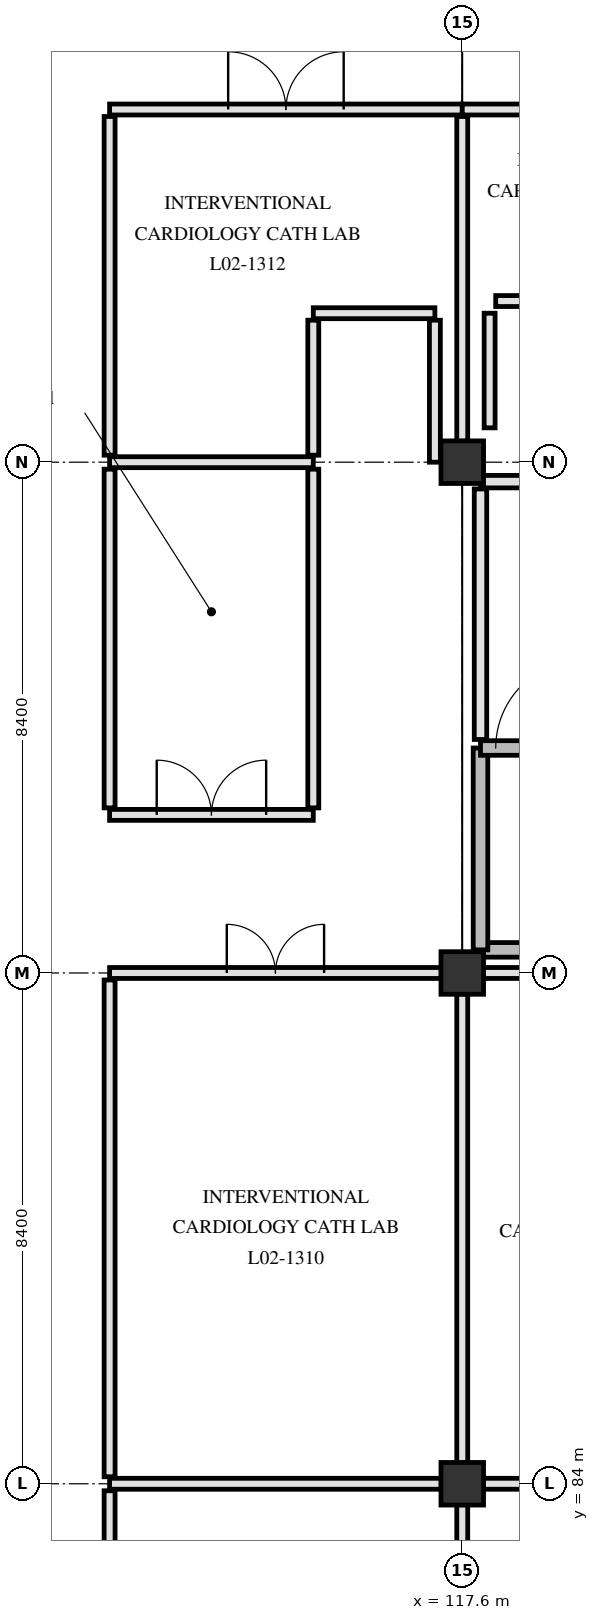
"""IFC4 building model, lengths in metres.
Left out: names, types, materials, properties, quantities, classifications, styles, units other than length and angle.
Written with IfcOpenShell. Run it as: python <this file> out.ifc"""

import sys

from ifc_helpers import new_model, si_unit, direction, frame, frame_2d, origin, origin_2d, place, context, subcontext, project, spatial, rectangle, extrude, element, fill, save


model = new_model("IFC4")
c1 = context("Model", 3, precision=1e-05, world=origin(), true_north=direction((0.0, 1.0)))
c2 = subcontext(c1, "Body", "Model", "MODEL_VIEW")
j1 = project(units=[si_unit("LENGTHUNIT", "METRE"), si_unit("PLANEANGLEUNIT", "RADIAN")], contexts=[c1])
p1 = place(None, origin())
s1 = spatial("IfcSite", under=j1, at=p1, CompositionType="ELEMENT")
p2 = place(p1, origin())
s2 = spatial("IfcBuilding", under=s1, at=p2, CompositionType="ELEMENT")
p3 = place(p2, frame((0.0, 0.0, 9.3)))
s3 = spatial("IfcBuildingStorey", under=s2, at=p3, CompositionType="ELEMENT", Elevation=9.3)
for number, where, z_axis, x_axis in (
    (1, (117.6, 84.0, 0.0), (0.0, 0.0, 1.0), (1.0, 0.0, 0.0)),
    (2, (117.6, 92.4, 0.0), (0.0, 0.0, 1.0), (1.0, 0.0, 0.0)),
    (3, (117.6, 100.8, 0.0), (0.0, 0.0, 1.0), (1.0, 0.0, 0.0)),
):
    element("IfcColumn", number, at=place(p3, frame(where, z_axis=z_axis, x_axis=x_axis)), inside=s3, PredefinedType="COLUMN", context=c2, shape_type="SweptSolid", body=[
        extrude(rectangle(XDim=0.7, YDim=0.7, at=origin_2d()), origin(), (0.0, 0.0, 1.0), 5.1),
    ])
p4 = place(p3, frame((117.9, 92.78, 0.0), z_axis=(0.0, 0.0, 1.0), x_axis=(1.0, 0.0, 0.0)))
e4 = element("IfcWall", 4, at=p4, inside=s3, PredefinedType="SHEAR", context=c2, shape_type="SweptSolid", body=[
    extrude(rectangle(XDim=7.82, YDim=0.24, at=frame_2d((3.91, 0.0))), origin(), (0.0, 0.0, 1.0), 4.78),
])
p5 = place(p3, frame((117.9, 92.78, 0.0), z_axis=(0.0, 0.0, 1.0), x_axis=(0.0, 1.0, 0.0)))
e5 = element("IfcWall", 5, at=p5, inside=s3, PredefinedType="SHEAR", context=c2, shape_type="SweptSolid", body=[
    extrude(rectangle(XDim=3.32, YDim=0.24, at=frame_2d((1.66, 0.0))), origin(), (0.0, 0.0, 1.0), 4.78),
])
p6 = place(p3, frame((117.9, 96.1, 0.0), z_axis=(0.0, 0.0, 1.0), x_axis=(1.0, 0.0, 0.0)))
e6 = element("IfcWall", 6, at=p6, inside=s3, PredefinedType="SHEAR", context=c2, shape_type="SweptSolid", body=[
    extrude(rectangle(XDim=7.82, YDim=0.24, at=frame_2d((3.91, 0.0))), origin(), (0.0, 0.0, 1.0), 4.78),
])
p7 = place(p6, frame((0.25, 0.0, 0.0)))
e7 = element("IfcOpeningElement", 7, at=p7, cuts=e6, PredefinedType="OPENING", context=c2, shape_type="SweptSolid", body=[
    extrude(rectangle(XDim=1.45, YDim=2.2, at=frame_2d((0.725, 1.1))), frame((0.0, 0.13, 0.0), z_axis=(0.0, -1.0, 0.0), x_axis=(1.0, 0.0, 0.0)), (0.0, 0.0, 1.0), 0.26),
])
p8 = place(p3, frame((117.9, 96.24, 0.0), z_axis=(0.0, 0.0, 1.0), x_axis=(0.0, 1.0, 0.0)))
e8 = element("IfcWall", 8, at=p8, inside=s3, PredefinedType="PARTITIONING", context=c2, shape_type="SweptSolid", body=[
    extrude(rectangle(XDim=4.12, YDim=0.205, at=frame_2d((2.06, 0.0))), origin(), (0.0, 0.0, 1.0), 4.17),
])
p9 = place(p3, frame((117.9, 100.48, 0.0), z_axis=(0.0, 0.0, 1.0), x_axis=(1.0, 0.0, 0.0)))
e9 = element("IfcWall", 9, at=p9, inside=s3, PredefinedType="PARTITIONING", context=c2, shape_type="SweptSolid", body=[
    extrude(rectangle(XDim=4.18, YDim=0.205, at=frame_2d((2.09, 0.0))), origin(), (0.0, 0.0, 1.0), 4.17),
])
p10 = place(p9, frame((1.29, 0.0, 0.0)))
e10 = element("IfcOpeningElement", 10, at=p10, cuts=e9, PredefinedType="OPENING", context=c2, shape_type="SweptSolid", body=[
    extrude(rectangle(XDim=1.6, YDim=2.25, at=frame_2d((0.8, 1.125))), frame((0.0, 0.113, 0.0), z_axis=(0.0, -1.0, 0.0), x_axis=(1.0, 0.0, 0.0)), (0.0, 0.0, 1.0), 0.225),
])
p11 = place(p3, frame((111.8, 84.0, 0.0), z_axis=(0.0, 0.0, 1.0), x_axis=(1.0, 0.0, 0.0)))
e11 = element("IfcWall", 11, at=p11, inside=s3, PredefinedType="PARTITIONING", context=c2, shape_type="SweptSolid", body=[
    extrude(rectangle(XDim=5.455, YDim=0.18, at=frame_2d((2.728, 0.0))), origin(), (0.0, 0.0, 1.0), 4.17),
])
p12 = place(p3, frame((117.945, 84.0, 0.0), z_axis=(0.0, 0.0, 1.0), x_axis=(1.0, 0.0, 0.0)))
e12 = element("IfcWall", 12, at=p12, inside=s3, PredefinedType="PARTITIONING", context=c2, shape_type="SweptSolid", body=[
    extrude(rectangle(XDim=5.605, YDim=0.18, at=frame_2d((2.802, 0.0))), origin(), (0.0, 0.0, 1.0), 4.17),
])
p13 = place(p3, frame((111.8, 92.4, 0.0), z_axis=(0.0, 0.0, 1.0), x_axis=(1.0, 0.0, 0.0)))
e13 = element("IfcWall", 13, at=p13, inside=s3, PredefinedType="PARTITIONING", context=c2, shape_type="SweptSolid", body=[
    extrude(rectangle(XDim=5.455, YDim=0.18, at=frame_2d((2.728, 0.0))), origin(), (0.0, 0.0, 1.0), 4.17),
])
p14 = place(p13, frame((1.927, 0.0, 0.0)))
e14 = element("IfcOpeningElement", 14, at=p14, cuts=e13, PredefinedType="OPENING", context=c2, shape_type="SweptSolid", body=[
    extrude(rectangle(XDim=1.6, YDim=2.25, at=frame_2d((0.8, 1.125))), frame((0.0, 0.1, 0.0), z_axis=(0.0, -1.0, 0.0), x_axis=(1.0, 0.0, 0.0)), (0.0, 0.0, 1.0), 0.2),
])
p15 = place(p3, frame((117.945, 92.4, 0.0), z_axis=(0.0, 0.0, 1.0), x_axis=(1.0, 0.0, 0.0)))
e15 = element("IfcWall", 15, at=p15, inside=s3, PredefinedType="PARTITIONING", context=c2, shape_type="SweptSolid", body=[
    extrude(rectangle(XDim=7.71, YDim=0.18, at=frame_2d((3.855, 0.0))), origin(), (0.0, 0.0, 1.0), 4.17),
])
p16 = place(p3, frame((111.8, 95.0, 0.0), z_axis=(0.0, 0.0, 1.0), x_axis=(1.0, 0.0, 0.0)))
e16 = element("IfcWall", 16, at=p16, inside=s3, PredefinedType="PARTITIONING", context=c2, shape_type="SweptSolid", body=[
    extrude(rectangle(XDim=3.35, YDim=0.18, at=frame_2d((1.675, 0.0))), origin(), (0.0, 0.0, 1.0), 4.77),
])
p17 = place(p16, frame((0.775, 0.0, 0.0)))
e17 = element("IfcOpeningElement", 17, at=p17, cuts=e16, PredefinedType="OPENING", context=c2, shape_type="SweptSolid", body=[
    extrude(rectangle(XDim=1.8, YDim=2.25, at=frame_2d((0.9, 1.125))), frame((0.0, 0.1, 0.0), z_axis=(0.0, -1.0, 0.0), x_axis=(1.0, 0.0, 0.0)), (0.0, 0.0, 1.0), 0.2),
])
p18 = place(p3, frame((111.8, 100.8, 0.0), z_axis=(0.0, 0.0, 1.0), x_axis=(1.0, 0.0, 0.0)))
e18 = element("IfcWall", 18, at=p18, inside=s3, PredefinedType="PARTITIONING", context=c2, shape_type="SweptSolid", body=[
    extrude(rectangle(XDim=3.35, YDim=0.18, at=frame_2d((1.675, 0.0))), origin(), (0.0, 0.0, 1.0), 4.17),
])
p19 = place(p3, frame((115.15, 103.25, 0.0), z_axis=(0.0, 0.0, 1.0), x_axis=(1.0, 0.0, 0.0)))
e19 = element("IfcWall", 19, at=p19, inside=s3, PredefinedType="PARTITIONING", context=c2, shape_type="SweptSolid", body=[
    extrude(rectangle(XDim=2.0, YDim=0.18, at=frame_2d((1.0, 0.0))), origin(), (0.0, 0.0, 1.0), 4.77),
])
p20 = place(p3, frame((118.15, 103.45, 0.0), z_axis=(0.0, 0.0, 1.0), x_axis=(1.0, 0.0, 0.0)))
e20 = element("IfcWall", 20, at=p20, inside=s3, PredefinedType="PARTITIONING", context=c2, shape_type="SweptSolid", body=[
    extrude(rectangle(XDim=7.85, YDim=0.18, at=frame_2d((3.925, 0.0))), origin(), (0.0, 0.0, 1.0), 4.17),
])
p21 = place(p20, frame((3.055, 0.0, 0.0)))
e21 = element("IfcOpeningElement", 21, at=p21, cuts=e20, PredefinedType="OPENING", context=c2, shape_type="SweptSolid", body=[
    extrude(rectangle(XDim=1.74, YDim=2.24, at=frame_2d((0.87, 1.12))), frame((0.0, 0.1, 0.0), z_axis=(0.0, -1.0, 0.0), x_axis=(1.0, 0.0, 0.0)), (0.0, 0.0, 1.0), 0.2),
])
p22 = place(p3, frame((111.8, 106.6, 0.0), z_axis=(0.0, 0.0, 1.0), x_axis=(1.0, 0.0, 0.0)))
e22 = element("IfcWall", 22, at=p22, inside=s3, PredefinedType="PARTITIONING", context=c2, shape_type="SweptSolid", body=[
    extrude(rectangle(XDim=5.8, YDim=0.18, at=frame_2d((2.9, 0.0))), origin(), (0.0, 0.0, 1.0), 4.17),
])
p23 = place(p22, frame((1.95, 0.0, 0.0)))
e23 = element("IfcOpeningElement", 23, at=p23, cuts=e22, PredefinedType="OPENING", context=c2, shape_type="SweptSolid", body=[
    extrude(rectangle(XDim=1.9, YDim=2.3, at=frame_2d((0.95, 1.15))), frame((0.0, 0.1, 0.0), z_axis=(0.0, -1.0, 0.0), x_axis=(1.0, 0.0, 0.0)), (0.0, 0.0, 1.0), 0.2),
])
p24 = place(p3, frame((117.6, 106.6, 0.0), z_axis=(0.0, 0.0, 1.0), x_axis=(1.0, 0.0, 0.0)))
e24 = element("IfcWall", 24, at=p24, inside=s3, PredefinedType="PARTITIONING", context=c2, shape_type="SweptSolid", body=[
    extrude(rectangle(XDim=8.4, YDim=0.18, at=frame_2d((4.2, 0.0))), origin(), (0.0, 0.0, 1.0), 4.17),
])
p25 = place(p3, frame((111.8, 78.315, 0.0), z_axis=(0.0, 0.0, 1.0), x_axis=(0.0, 1.0, 0.0)))
e25 = element("IfcWall", 25, at=p25, inside=s3, PredefinedType="PARTITIONING", context=c2, shape_type="SweptSolid", body=[
    extrude(rectangle(XDim=5.57, YDim=0.18, at=frame_2d((2.785, 0.0))), origin(), (0.0, 0.0, 1.0), 4.17),
])
p26 = place(p3, frame((111.8, 84.115, 0.0), z_axis=(0.0, 0.0, 1.0), x_axis=(0.0, 1.0, 0.0)))
e26 = element("IfcWall", 26, at=p26, inside=s3, PredefinedType="PARTITIONING", context=c2, shape_type="SweptSolid", body=[
    extrude(rectangle(XDim=8.17, YDim=0.18, at=frame_2d((4.085, 0.0))), origin(), (0.0, 0.0, 1.0), 4.17),
])
for number, where, z_axis, x_axis in (
    (27, (111.8, 95.115, 0.0), (0.0, 0.0, 1.0), (0.0, 1.0, 0.0)),
    (28, (111.8, 100.915, 0.0), (0.0, 0.0, 1.0), (0.0, 1.0, 0.0)),
    (29, (115.15, 95.115, 0.0), (0.0, 0.0, 1.0), (0.0, 1.0, 0.0)),
):
    element("IfcWall", number, at=place(p3, frame(where, z_axis=z_axis, x_axis=x_axis)), inside=s3, PredefinedType="PARTITIONING", context=c2, shape_type="SweptSolid", body=[
        extrude(rectangle(XDim=5.57, YDim=0.18, at=frame_2d((2.785, 0.0))), origin(), (0.0, 0.0, 1.0), 4.17),
    ])
p27 = place(p3, frame((115.15, 100.915, 0.0), z_axis=(0.0, 0.0, 1.0), x_axis=(0.0, 1.0, 0.0)))
e30 = element("IfcWall", 30, at=p27, inside=s3, PredefinedType="PARTITIONING", context=c2, shape_type="SweptSolid", body=[
    extrude(rectangle(XDim=2.22, YDim=0.18, at=frame_2d((1.11, 0.0))), origin(), (0.0, 0.0, 1.0), 4.17),
])
p28 = place(p3, frame((117.15, 100.8, 0.0), z_axis=(0.0, 0.0, 1.0), x_axis=(0.0, 1.0, 0.0)))
e31 = element("IfcWall", 31, at=p28, inside=s3, PredefinedType="PARTITIONING", context=c2, shape_type="SweptSolid", body=[
    extrude(rectangle(XDim=2.335, YDim=0.18, at=frame_2d((1.167, 0.0))), origin(), (0.0, 0.0, 1.0), 4.17),
])
p29 = place(p3, frame((117.6, 78.315, 0.0), z_axis=(0.0, 0.0, 1.0), x_axis=(0.0, 1.0, 0.0)))
e32 = element("IfcWall", 32, at=p29, inside=s3, PredefinedType="PARTITIONING", context=c2, shape_type="SweptSolid", body=[
    extrude(rectangle(XDim=5.34, YDim=0.18, at=frame_2d((2.67, 0.0))), origin(), (0.0, 0.0, 1.0), 4.17),
])
p30 = place(p3, frame((117.6, 84.345, 0.0), z_axis=(0.0, 0.0, 1.0), x_axis=(0.0, 1.0, 0.0)))
e33 = element("IfcWall", 33, at=p30, inside=s3, PredefinedType="PARTITIONING", context=c2, shape_type="SweptSolid", body=[
    extrude(rectangle(XDim=7.71, YDim=0.18, at=frame_2d((3.855, 0.0))), origin(), (0.0, 0.0, 1.0), 4.17),
])
p31 = place(p3, frame((117.6, 101.145, 0.0), z_axis=(0.0, 0.0, 1.0), x_axis=(0.0, 1.0, 0.0)))
e34 = element("IfcWall", 34, at=p31, inside=s3, PredefinedType="PARTITIONING", context=c2, shape_type="SweptSolid", body=[
    extrude(rectangle(XDim=5.34, YDim=0.18, at=frame_2d((2.67, 0.0))), origin(), (0.0, 0.0, 1.0), 4.17),
])
p32 = place(p3, frame((118.05, 101.365, 0.0), z_axis=(0.0, 0.0, 1.0), x_axis=(0.0, 1.0, 0.0)))
e35 = element("IfcWall", 35, at=p32, inside=s3, PredefinedType="PARTITIONING", context=c2, shape_type="SweptSolid", body=[
    extrude(rectangle(XDim=1.885, YDim=0.18, at=frame_2d((0.942, 0.0))), origin(), (0.0, 0.0, 1.0), 4.77),
])
p33 = place(p7, origin())
e36 = element("IfcDoor", 36, at=p33, inside=s3, OperationType="SINGLE_SWING_RIGHT", PredefinedType="DOOR", context=c2, shape_type="SweptSolid", body=[
    extrude(rectangle(XDim=1.45, YDim=2.2, at=frame_2d((0.725, 1.1))), frame((0.0, 0.025, 0.0), z_axis=(0.0, -1.0, 0.0), x_axis=(1.0, 0.0, 0.0)), (0.0, 0.0, 1.0), 0.05),
])
fill(e7, e36)
p34 = place(p14, origin())
e37 = element("IfcDoor", 37, at=p34, inside=s3, OperationType="DOUBLE_SWING_LEFT", PredefinedType="DOOR", context=c2, shape_type="SweptSolid", body=[
    extrude(rectangle(XDim=1.6, YDim=2.25, at=frame_2d((0.8, 1.125))), frame((0.0, 0.025, 0.0), z_axis=(0.0, -1.0, 0.0), x_axis=(1.0, 0.0, 0.0)), (0.0, 0.0, 1.0), 0.05),
])
fill(e14, e37)
p35 = place(p17, origin())
e38 = element("IfcDoor", 38, at=p35, inside=s3, OperationType="DOUBLE_SWING_RIGHT", PredefinedType="DOOR", context=c2, shape_type="SweptSolid", body=[
    extrude(rectangle(XDim=1.8, YDim=2.25, at=frame_2d((0.9, 1.125))), frame((0.0, 0.025, 0.0), z_axis=(0.0, -1.0, 0.0), x_axis=(1.0, 0.0, 0.0)), (0.0, 0.0, 1.0), 0.05),
])
fill(e17, e38)
p36 = place(p23, origin())
e39 = element("IfcDoor", 39, at=p36, inside=s3, OperationType="DOUBLE_SWING_LEFT", PredefinedType="DOOR", context=c2, shape_type="SweptSolid", body=[
    extrude(rectangle(XDim=1.9, YDim=2.3, at=frame_2d((0.95, 1.15))), frame((0.0, 0.025, 0.0), z_axis=(0.0, -1.0, 0.0), x_axis=(1.0, 0.0, 0.0)), (0.0, 0.0, 1.0), 0.05),
])
fill(e23, e39)
save(model, sys.argv[1])
